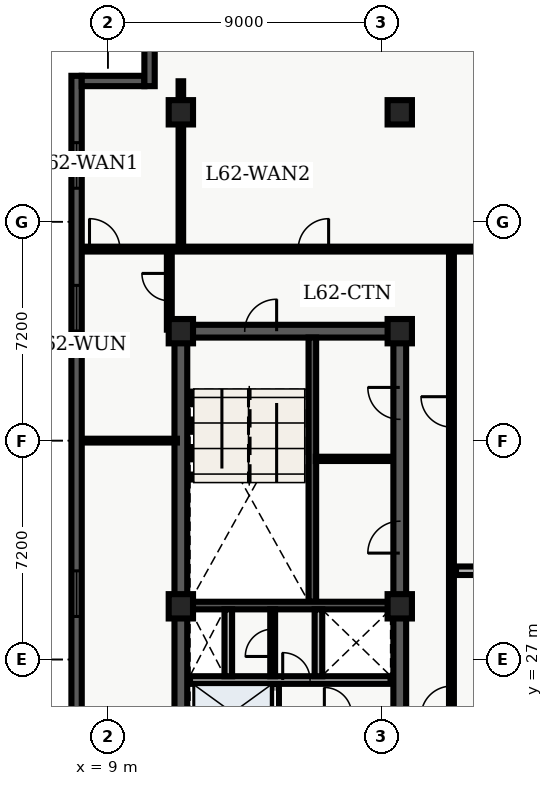
"""IFC4 building model, lengths in metres.
Left out: names, types, materials, properties, quantities, classifications, styles, units other than length and angle.
Written with IfcOpenShell. Run it as: python <this file> out.ifc"""

import sys

from ifc_helpers import new_model, entity, si_unit, converted_unit, direction, frame, origin_with_axes, origin_2d_with_axis, place, context, subcontext, project, spatial, polyline, rectangle, outline, extrude, element, fill, save


model = new_model("IFC4")
c1 = context("Model", 3, precision=1e-05, world=origin_with_axes(), true_north=direction((0.0, 1.0)))
c2 = subcontext(c1, "Body", "Model", "MODEL_VIEW")
j1 = project(units=[si_unit("LENGTHUNIT", "METRE"), converted_unit("PLANEANGLEUNIT", "DEGREE", entity("IfcPlaneAngleMeasure", 0.017), si_unit("PLANEANGLEUNIT", "RADIAN"), dimensions=[0, 0, 0, 0, 0, 0, 0])], contexts=[c1])
p1 = place(None, origin_with_axes())
s1 = spatial("IfcSite", under=j1, at=p1, CompositionType="ELEMENT")
p2 = place(p1, origin_with_axes())
s2 = spatial("IfcBuilding", under=s1, at=p2, CompositionType="ELEMENT")
p3 = place(p2, frame((0.0, 0.0, 252.9), z_axis=(0.0, 0.0, 1.0), x_axis=(1.0, 0.0, 0.0)))
s3 = spatial("IfcBuildingStorey", under=s2, at=p3, CompositionType="ELEMENT", Elevation=252.9)
p4 = place(p3, frame((11.4, 10.8, 0.0), z_axis=(0.0, 0.0, 1.0), x_axis=(0.0, 1.0, 0.0)))
e1 = element("IfcWall", 1, at=p4, inside=s3, PredefinedType="SHEAR", context=c2, shape_type="SweptSolid", body=[
    extrude(outline(polyline([(0.0, -0.21), (27.0, -0.21), (27.0, 0.21), (0.0, 0.21), (0.0, -0.21)])), origin_with_axes(), (0.0, 0.0, 1.0), 3.66),
])
p5 = place(p3, frame((11.4, 37.8, 0.0), z_axis=(0.0, 0.0, 1.0), x_axis=(1.0, 0.0, 0.0)))
e2 = element("IfcWall", 2, at=p5, inside=s3, PredefinedType="SHEAR", context=c2, shape_type="SweptSolid", body=[
    extrude(outline(polyline([(0.0, -0.21), (7.2, -0.21), (7.2, 0.21), (0.0, 0.21), (0.0, -0.21)])), origin_with_axes(), (0.0, 0.0, 1.0), 3.66),
])
p6 = place(p5, frame((2.625, 0.0, 0.0), z_axis=(0.0, 0.0, 1.0), x_axis=(1.0, 0.0, 0.0)))
e3 = element("IfcOpeningElement", 3, at=p6, cuts=e2, PredefinedType="OPENING", context=c2, shape_type="SweptSolid", body=[
    extrude(rectangle(XDim=1.05, YDim=0.44, at=origin_2d_with_axis()), origin_with_axes(), (0.0, 0.0, 1.0), 2.15),
])
p7 = place(p3, frame((18.6, 24.3, 0.0), z_axis=(0.0, 0.0, 1.0), x_axis=(0.0, 1.0, 0.0)))
e4 = element("IfcWall", 4, at=p7, inside=s3, PredefinedType="SHEAR", context=c2, shape_type="SweptSolid", body=[
    extrude(outline(polyline([(0.0, -0.21), (13.5, -0.21), (13.5, 0.21), (0.0, 0.21), (0.0, -0.21)])), origin_with_axes(), (0.0, 0.0, 1.0), 3.66),
])
p8 = place(p7, frame((6.725, 0.0, 0.0), z_axis=(0.0, 0.0, 1.0), x_axis=(1.0, 0.0, 0.0)))
e5 = element("IfcOpeningElement", 5, at=p8, cuts=e4, PredefinedType="OPENING", context=c2, shape_type="SweptSolid", body=[
    extrude(rectangle(XDim=1.05, YDim=0.44, at=origin_2d_with_axis()), origin_with_axes(), (0.0, 0.0, 1.0), 2.15),
])
p9 = place(p7, frame((11.125, 0.0, 0.0), z_axis=(0.0, 0.0, 1.0), x_axis=(1.0, 0.0, 0.0)))
e6 = element("IfcOpeningElement", 6, at=p9, cuts=e4, PredefinedType="OPENING", context=c2, shape_type="SweptSolid", body=[
    extrude(rectangle(XDim=1.05, YDim=0.44, at=origin_2d_with_axis()), origin_with_axes(), (0.0, 0.0, 1.0), 2.15),
])
p10 = place(p3, frame((15.725, 28.9, 0.0), z_axis=(0.0, 0.0, 1.0), x_axis=(0.0, 1.0, 0.0)))
e7 = element("IfcWall", 7, at=p10, inside=s3, PredefinedType="SHEAR", context=c2, shape_type="SweptSolid", body=[
    extrude(outline(polyline([(0.0, -0.125), (8.69, -0.125), (8.69, 0.125), (0.0, 0.125), (0.0, -0.125)])), origin_with_axes(), (0.0, 0.0, 1.0), 3.66),
])
p11 = place(p3, frame((11.61, 28.775, 0.0), z_axis=(0.0, 0.0, 1.0), x_axis=(1.0, 0.0, 0.0)))
e8 = element("IfcWall", 8, at=p11, inside=s3, PredefinedType="SHEAR", context=c2, shape_type="SweptSolid", body=[
    extrude(outline(polyline([(0.0, -0.125), (6.78, -0.125), (6.78, 0.125), (0.0, 0.125), (0.0, -0.125)])), origin_with_axes(), (0.0, 0.0, 1.0), 3.66),
])
p12 = place(p3, frame((14.5, 19.95, 0.0), z_axis=(0.0, 0.0, 1.0), x_axis=(0.0, 1.0, 0.0)))
e9 = element("IfcWall", 9, at=p12, inside=s3, PredefinedType="SOLIDWALL", context=c2, shape_type="SweptSolid", body=[
    extrude(outline(polyline([(0.0, -0.125), (6.25, -0.125), (6.25, 0.125), (0.0, 0.125), (0.0, -0.125)])), origin_with_axes(), (0.0, 0.0, 1.0), 2.7),
])
p13 = place(p12, frame((1.025, 0.0, 0.0), z_axis=(0.0, 0.0, 1.0), x_axis=(1.0, 0.0, 0.0)))
e10 = element("IfcOpeningElement", 10, at=p13, cuts=e9, PredefinedType="OPENING", context=c2, shape_type="SweptSolid", body=[
    extrude(rectangle(XDim=1.1, YDim=0.27, at=origin_2d_with_axis()), origin_with_axes(), (0.0, 0.0, 1.0), 2.15),
])
p14 = place(p12, frame((2.975, 0.0, 0.0), z_axis=(0.0, 0.0, 1.0), x_axis=(1.0, 0.0, 0.0)))
e11 = element("IfcOpeningElement", 11, at=p14, cuts=e9, PredefinedType="OPENING", context=c2, shape_type="SweptSolid", body=[
    extrude(rectangle(XDim=1.1, YDim=0.27, at=origin_2d_with_axis()), origin_with_axes(), (0.0, 0.0, 1.0), 2.15),
])
p15 = place(p12, frame((5.425, 0.0, 0.0), z_axis=(0.0, 0.0, 1.0), x_axis=(1.0, 0.0, 0.0)))
e12 = element("IfcOpeningElement", 12, at=p15, cuts=e9, PredefinedType="OPENING", context=c2, shape_type="SweptSolid", body=[
    extrude(rectangle(XDim=1.2, YDim=0.27, at=origin_2d_with_axis()), origin_with_axes(), (0.0, 0.0, 1.0), 2.15),
])
p16 = place(p3, frame((11.7, 26.325, 0.0), z_axis=(0.0, 0.0, 1.0), x_axis=(1.0, 0.0, 0.0)))
e13 = element("IfcWall", 13, at=p16, inside=s3, PredefinedType="SOLIDWALL", context=c2, shape_type="SweptSolid", body=[
    extrude(outline(polyline([(0.0, -0.125), (6.6, -0.125), (6.6, 0.125), (0.0, 0.125), (0.0, -0.125)])), origin_with_axes(), (0.0, 0.0, 1.0), 2.7),
])
p17 = place(p16, frame((3.5, 0.0, 0.0), z_axis=(0.0, 0.0, 1.0), x_axis=(1.0, 0.0, 0.0)))
e14 = element("IfcOpeningElement", 14, at=p17, cuts=e13, PredefinedType="OPENING", context=c2, shape_type="SweptSolid", body=[
    extrude(rectangle(XDim=0.9, YDim=0.27, at=origin_2d_with_axis()), origin_with_axes(), (0.0, 0.0, 1.0), 2.15),
])
for number, where, z_axis, x_axis in (
    (15, (12.96, 26.45, 0.0), (0.0, 0.0, 1.0), (0.0, 1.0, 0.0)),
    (16, (15.925, 26.45, 0.0), (0.0, 0.0, 1.0), (0.0, 1.0, 0.0)),
):
    element("IfcWall", number, at=place(p3, frame(where, z_axis=z_axis, x_axis=x_axis)), inside=s3, PredefinedType="SOLIDWALL", context=c2, shape_type="SweptSolid", body=[
        extrude(outline(polyline([(0.0, -0.125), (2.2, -0.125), (2.2, 0.125), (0.0, 0.125), (0.0, -0.125)])), origin_with_axes(), (0.0, 0.0, 1.0), 2.7),
    ])
for number, where, z_axis, x_axis in (
    (17, (11.4, 28.75, 0.0), (0.0, 0.0, 1.0), (1.0, 0.0, 0.0)),
    (18, (11.4, 37.8, 0.0), (0.0, 0.0, 1.0), (1.0, 0.0, 0.0)),
    (19, (11.4, 45.0, 0.0), (0.0, 0.0, 1.0), (1.0, 0.0, 0.0)),
    (20, (18.6, 28.75, 0.0), (0.0, 0.0, 1.0), (1.0, 0.0, 0.0)),
    (21, (18.6, 37.8, 0.0), (0.0, 0.0, 1.0), (1.0, 0.0, 0.0)),
    (22, (18.6, 45.0, 0.0), (0.0, 0.0, 1.0), (1.0, 0.0, 0.0)),
):
    element("IfcColumn", number, at=place(p3, frame(where, z_axis=z_axis, x_axis=x_axis)), inside=s3, PredefinedType="COLUMN", context=c2, shape_type="SweptSolid", body=[
        extrude(rectangle(XDim=0.8, YDim=0.8, at=origin_2d_with_axis()), origin_with_axes(), (0.0, 0.0, 1.0), 3.9),
    ])
p18 = place(p3, frame((14.42, 26.45, 0.0), z_axis=(0.0, 0.0, 1.0), x_axis=(0.0, 1.0, 0.0)))
e23 = element("IfcWall", 23, at=p18, inside=s3, PredefinedType="PARTITIONING", context=c2, shape_type="SweptSolid", body=[
    extrude(outline(polyline([(0.0, -0.08), (2.2, -0.08), (2.2, 0.08), (0.0, 0.08), (0.0, -0.08)])), origin_with_axes(), (0.0, 0.0, 1.0), 2.7),
])
p19 = place(p18, frame((1.1, 0.0, 0.0), z_axis=(0.0, 0.0, 1.0), x_axis=(1.0, 0.0, 0.0)))
e24 = element("IfcOpeningElement", 24, at=p19, cuts=e23, PredefinedType="OPENING", context=c2, shape_type="SweptSolid", body=[
    extrude(rectangle(XDim=0.9, YDim=0.18, at=origin_2d_with_axis()), origin_with_axes(), (0.0, 0.0, 1.0), 2.15),
])
p20 = place(p3, frame((15.84, 33.6, 0.0), z_axis=(0.0, 0.0, 1.0), x_axis=(1.0, 0.0, 0.0)))
e25 = element("IfcWall", 25, at=p20, inside=s3, PredefinedType="PARTITIONING", context=c2, shape_type="SweptSolid", body=[
    extrude(outline(polyline([(0.0, -0.07), (2.46, -0.07), (2.46, 0.07), (0.0, 0.07), (0.0, -0.07)])), origin_with_axes(), (0.0, 0.0, 1.0), 2.7),
])
p21 = place(p3, frame((8.135, 40.5, 0.0), z_axis=(0.0, 0.0, 1.0), x_axis=(1.0, 0.0, 0.0)))
e26 = element("IfcWall", 26, at=p21, inside=s3, PredefinedType="PARTITIONING", context=c2, shape_type="SweptSolid", body=[
    extrude(outline(polyline([(0.0, -0.08), (23.93, -0.08), (23.93, 0.08), (0.0, 0.08), (0.0, -0.08)])), origin_with_axes(), (0.0, 0.0, 1.0), 2.7),
])
p22 = place(p21, frame((0.76, 0.0, 0.0), z_axis=(0.0, 0.0, 1.0), x_axis=(1.0, 0.0, 0.0)))
e27 = element("IfcOpeningElement", 27, at=p22, cuts=e26, PredefinedType="OPENING", context=c2, shape_type="SweptSolid", body=[
    extrude(rectangle(XDim=1.0, YDim=0.18, at=origin_2d_with_axis()), origin_with_axes(), (0.0, 0.0, 1.0), 2.15),
])
p23 = place(p21, frame((7.625, 0.0, 0.0), z_axis=(0.0, 0.0, 1.0), x_axis=(1.0, 0.0, 0.0)))
e28 = element("IfcOpeningElement", 28, at=p23, cuts=e26, PredefinedType="OPENING", context=c2, shape_type="SweptSolid", body=[
    extrude(rectangle(XDim=1.0, YDim=0.18, at=origin_2d_with_axis()), origin_with_axes(), (0.0, 0.0, 1.0), 2.15),
])
p24 = place(p3, frame((20.3, 7.8, 0.0), z_axis=(0.0, 0.0, 1.0), x_axis=(0.0, 1.0, 0.0)))
e29 = element("IfcWall", 29, at=p24, inside=s3, PredefinedType="PARTITIONING", context=c2, shape_type="SweptSolid", body=[
    extrude(outline(polyline([(0.0, -0.08), (32.7, -0.08), (32.7, 0.08), (0.0, 0.08), (0.0, -0.08)])), origin_with_axes(), (0.0, 0.0, 1.0), 2.7),
])
p25 = place(p24, frame((17.825, 0.0, 0.0), z_axis=(0.0, 0.0, 1.0), x_axis=(1.0, 0.0, 0.0)))
e30 = element("IfcOpeningElement", 30, at=p25, cuts=e29, PredefinedType="OPENING", context=c2, shape_type="SweptSolid", body=[
    extrude(rectangle(XDim=1.0, YDim=0.18, at=origin_2d_with_axis()), origin_with_axes(), (0.0, 0.0, 1.0), 2.15),
])
p26 = place(p24, frame((27.345, 0.0, 0.0), z_axis=(0.0, 0.0, 1.0), x_axis=(1.0, 0.0, 0.0)))
e31 = element("IfcOpeningElement", 31, at=p26, cuts=e29, PredefinedType="OPENING", context=c2, shape_type="SweptSolid", body=[
    extrude(rectangle(XDim=1.0, YDim=0.18, at=origin_2d_with_axis()), origin_with_axes(), (0.0, 0.0, 1.0), 2.15),
])
p27 = place(p24, frame((5.775, 0.0, 0.0), z_axis=(0.0, 0.0, 1.0), x_axis=(1.0, 0.0, 0.0)))
e32 = element("IfcOpeningElement", 32, at=p27, cuts=e29, PredefinedType="OPENING", context=c2, shape_type="SweptSolid", body=[
    extrude(rectangle(XDim=1.05, YDim=0.18, at=origin_2d_with_axis()), origin_with_axes(), (0.0, 0.0, 1.0), 2.15),
])
p28 = place(p3, frame((11.02, 37.85, 0.0), z_axis=(0.0, 0.0, 1.0), x_axis=(0.0, 1.0, 0.0)))
e33 = element("IfcWall", 33, at=p28, inside=s3, PredefinedType="PARTITIONING", context=c2, shape_type="SweptSolid", body=[
    extrude(outline(polyline([(0.0, -0.08), (2.65, -0.08), (2.65, 0.08), (0.0, 0.08), (0.0, -0.08)])), origin_with_axes(), (0.0, 0.0, 1.0), 2.7),
])
p29 = place(p28, frame((1.4, 0.0, 0.0), z_axis=(0.0, 0.0, 1.0), x_axis=(1.0, 0.0, 0.0)))
e34 = element("IfcOpeningElement", 34, at=p29, cuts=e33, PredefinedType="OPENING", context=c2, shape_type="SweptSolid", body=[
    extrude(rectangle(XDim=0.9, YDim=0.18, at=origin_2d_with_axis()), origin_with_axes(), (0.0, 0.0, 1.0), 2.15),
])
p30 = place(p3, frame((8.135, 34.2, 0.0), z_axis=(0.0, 0.0, 1.0), x_axis=(1.0, 0.0, 0.0)))
e35 = element("IfcWall", 35, at=p30, inside=s3, PredefinedType="PARTITIONING", context=c2, shape_type="SweptSolid", body=[
    extrude(outline(polyline([(0.0, -0.062), (3.135, -0.062), (3.135, 0.062), (0.0, 0.062), (0.0, -0.062)])), origin_with_axes(), (0.0, 0.0, 1.0), 2.7),
])
p31 = place(p3, frame((11.4, 40.6, 0.0), z_axis=(0.0, 0.0, 1.0), x_axis=(0.0, 1.0, 0.0)))
e36 = element("IfcWall", 36, at=p31, inside=s3, PredefinedType="PARTITIONING", context=c2, shape_type="SweptSolid", body=[
    extrude(outline(polyline([(0.0, -0.075), (5.42, -0.075), (5.42, 0.075), (0.0, 0.075), (0.0, -0.075)])), origin_with_axes(), (0.0, 0.0, 1.0), 2.7),
])
p32 = place(p3, frame((20.45, 29.92, 0.0), z_axis=(0.0, 0.0, 1.0), x_axis=(1.0, 0.0, 0.0)))
e37 = element("IfcWall", 37, at=p32, inside=s3, PredefinedType="PARTITIONING", context=c2, shape_type="SweptSolid", body=[
    extrude(outline(polyline([(0.0, -0.14), (11.615, -0.14), (11.615, 0.14), (0.0, 0.14), (0.0, -0.14)])), origin_with_axes(), (0.0, 0.0, 1.0), 2.7),
])
p33 = place(p3, frame((7.97, 2.74, 0.0), z_axis=(0.0, 0.0, 1.0), x_axis=(0.0, 1.0, 0.0)))
e38 = element("IfcWall", 38, at=p33, inside=s3, PredefinedType="SOLIDWALL", context=c2, shape_type="SweptSolid", body=[
    extrude(outline(polyline([(0.0, -0.17), (43.46, -0.17), (43.46, 0.17), (0.0, 0.17), (0.0, -0.17)])), origin_with_axes(), (0.0, 0.0, 1.0), 3.66),
])
p34 = place(p33, frame((2.948, 0.0, 0.45), z_axis=(0.0, 0.0, 1.0), x_axis=(1.0, 0.0, 0.0)))
e39 = element("IfcOpeningElement", 39, at=p34, cuts=e38, PredefinedType="OPENING", context=c2, shape_type="SweptSolid", body=[
    extrude(rectangle(XDim=1.5, YDim=0.36, at=origin_2d_with_axis()), origin_with_axes(), (0.0, 0.0, 1.0), 2.1),
])
p35 = place(p33, frame((7.643, 0.0, 0.45), z_axis=(0.0, 0.0, 1.0), x_axis=(1.0, 0.0, 0.0)))
e40 = element("IfcOpeningElement", 40, at=p35, cuts=e38, PredefinedType="OPENING", context=c2, shape_type="SweptSolid", body=[
    extrude(rectangle(XDim=1.5, YDim=0.36, at=origin_2d_with_axis()), origin_with_axes(), (0.0, 0.0, 1.0), 2.1),
])
p36 = place(p33, frame((13.189, 0.0, 0.45), z_axis=(0.0, 0.0, 1.0), x_axis=(1.0, 0.0, 0.0)))
e41 = element("IfcOpeningElement", 41, at=p36, cuts=e38, PredefinedType="OPENING", context=c2, shape_type="SweptSolid", body=[
    extrude(rectangle(XDim=1.5, YDim=0.36, at=origin_2d_with_axis()), origin_with_axes(), (0.0, 0.0, 1.0), 2.1),
])
p37 = place(p33, frame((17.034, 0.0, 0.45), z_axis=(0.0, 0.0, 1.0), x_axis=(1.0, 0.0, 0.0)))
e42 = element("IfcOpeningElement", 42, at=p37, cuts=e38, PredefinedType="OPENING", context=c2, shape_type="SweptSolid", body=[
    extrude(rectangle(XDim=1.5, YDim=0.36, at=origin_2d_with_axis()), origin_with_axes(), (0.0, 0.0, 1.0), 2.1),
])
p38 = place(p33, frame((21.73, 0.0, 0.45), z_axis=(0.0, 0.0, 1.0), x_axis=(1.0, 0.0, 0.0)))
e43 = element("IfcOpeningElement", 43, at=p38, cuts=e38, PredefinedType="OPENING", context=c2, shape_type="SweptSolid", body=[
    extrude(rectangle(XDim=1.5, YDim=0.36, at=origin_2d_with_axis()), origin_with_axes(), (0.0, 0.0, 1.0), 2.1),
])
p39 = place(p33, frame((26.426, 0.0, 0.45), z_axis=(0.0, 0.0, 1.0), x_axis=(1.0, 0.0, 0.0)))
e44 = element("IfcOpeningElement", 44, at=p39, cuts=e38, PredefinedType="OPENING", context=c2, shape_type="SweptSolid", body=[
    extrude(rectangle(XDim=1.5, YDim=0.36, at=origin_2d_with_axis()), origin_with_axes(), (0.0, 0.0, 1.0), 2.1),
])
p40 = place(p33, frame((35.817, 0.0, 0.45), z_axis=(0.0, 0.0, 1.0), x_axis=(1.0, 0.0, 0.0)))
e45 = element("IfcOpeningElement", 45, at=p40, cuts=e38, PredefinedType="OPENING", context=c2, shape_type="SweptSolid", body=[
    extrude(rectangle(XDim=1.5, YDim=0.36, at=origin_2d_with_axis()), origin_with_axes(), (0.0, 0.0, 1.0), 2.1),
])
p41 = place(p33, frame((40.512, 0.0, 0.45), z_axis=(0.0, 0.0, 1.0), x_axis=(1.0, 0.0, 0.0)))
e46 = element("IfcOpeningElement", 46, at=p41, cuts=e38, PredefinedType="OPENING", context=c2, shape_type="SweptSolid", body=[
    extrude(rectangle(XDim=1.5, YDim=0.36, at=origin_2d_with_axis()), origin_with_axes(), (0.0, 0.0, 1.0), 2.1),
])
p42 = place(p3, frame((8.14, 46.03, 0.0), z_axis=(0.0, 0.0, 1.0), x_axis=(1.0, 0.0, 0.0)))
e47 = element("IfcWall", 47, at=p42, inside=s3, PredefinedType="SOLIDWALL", context=c2, shape_type="SweptSolid", body=[
    extrude(outline(polyline([(0.0, -0.17), (2.06, -0.17), (2.06, 0.17), (0.0, 0.17), (0.0, -0.17)])), origin_with_axes(), (0.0, 0.0, 1.0), 3.66),
])
p43 = place(p3, frame((10.37, 45.86, 0.0), z_axis=(0.0, 0.0, 1.0), x_axis=(0.0, 1.0, 0.0)))
e48 = element("IfcWall", 48, at=p43, inside=s3, PredefinedType="SOLIDWALL", context=c2, shape_type="SweptSolid", body=[
    extrude(outline(polyline([(0.0, -0.17), (2.74, -0.17), (2.74, 0.17), (0.0, 0.17), (0.0, -0.17)])), origin_with_axes(), (0.0, 0.0, 1.0), 3.66),
])
p44 = place(p12, frame((5.425, 0.0, 0.0), z_axis=(0.0, 0.0, 1.0), x_axis=(1.0, 0.0, 0.0)))
e49 = element("IfcDoor", 49, at=p44, inside=s3, OperationType="DOUBLE_DOOR_SLIDING", PredefinedType="DOOR", context=c2, shape_type="SweptSolid", body=[
    extrude(rectangle(XDim=1.2, YDim=0.09, at=origin_2d_with_axis()), origin_with_axes(), (0.0, 0.0, 1.0), 2.15),
])
fill(e12, e49)
p45 = place(p5, frame((2.625, 0.0, 0.0), z_axis=(0.0, 0.0, 1.0), x_axis=(1.0, 0.0, 0.0)))
e50 = element("IfcDoor", 50, at=p45, inside=s3, OperationType="SINGLE_SWING_RIGHT", PredefinedType="DOOR", context=c2, shape_type="SweptSolid", body=[
    extrude(rectangle(XDim=1.05, YDim=0.09, at=origin_2d_with_axis()), origin_with_axes(), (0.0, 0.0, 1.0), 2.15),
])
fill(e3, e50)
p46 = place(p16, frame((3.5, 0.0, 0.0), z_axis=(0.0, 0.0, 1.0), x_axis=(1.0, 0.0, 0.0)))
e51 = element("IfcDoor", 51, at=p46, inside=s3, OperationType="SINGLE_SWING_LEFT", PredefinedType="DOOR", context=c2, shape_type="SweptSolid", body=[
    extrude(rectangle(XDim=0.9, YDim=0.09, at=origin_2d_with_axis()), origin_with_axes(), (0.0, 0.0, 1.0), 2.15),
])
fill(e14, e51)
p47 = place(p18, frame((1.1, 0.0, 0.0), z_axis=(0.0, 0.0, 1.0), x_axis=(1.0, 0.0, 0.0)))
e52 = element("IfcDoor", 52, at=p47, inside=s3, OperationType="SINGLE_SWING_LEFT", PredefinedType="DOOR", context=c2, shape_type="SweptSolid", body=[
    extrude(rectangle(XDim=0.9, YDim=0.09, at=origin_2d_with_axis()), origin_with_axes(), (0.0, 0.0, 1.0), 2.15),
])
fill(e24, e52)
p48 = place(p7, frame((6.725, 0.0, 0.0), z_axis=(0.0, 0.0, 1.0), x_axis=(1.0, 0.0, 0.0)))
e53 = element("IfcDoor", 53, at=p48, inside=s3, OperationType="SINGLE_SWING_LEFT", PredefinedType="DOOR", context=c2, shape_type="SweptSolid", body=[
    extrude(rectangle(XDim=1.05, YDim=0.09, at=origin_2d_with_axis()), origin_with_axes(), (0.0, 0.0, 1.0), 2.15),
])
fill(e5, e53)
p49 = place(p7, frame((11.125, 0.0, 0.0), z_axis=(0.0, 0.0, 1.0), x_axis=(1.0, 0.0, 0.0)))
e54 = element("IfcDoor", 54, at=p49, inside=s3, OperationType="SINGLE_SWING_RIGHT", PredefinedType="DOOR", context=c2, shape_type="SweptSolid", body=[
    extrude(rectangle(XDim=1.05, YDim=0.09, at=origin_2d_with_axis()), origin_with_axes(), (0.0, 0.0, 1.0), 2.15),
])
fill(e6, e54)
p50 = place(p28, frame((1.4, 0.0, 0.0), z_axis=(0.0, 0.0, 1.0), x_axis=(1.0, 0.0, 0.0)))
e55 = element("IfcDoor", 55, at=p50, inside=s3, OperationType="SINGLE_SWING_RIGHT", PredefinedType="DOOR", context=c2, shape_type="SweptSolid", body=[
    extrude(rectangle(XDim=0.9, YDim=0.09, at=origin_2d_with_axis()), origin_with_axes(), (0.0, 0.0, 1.0), 2.15),
])
fill(e34, e55)
p51 = place(p21, frame((0.76, 0.0, 0.0), z_axis=(0.0, 0.0, 1.0), x_axis=(1.0, 0.0, 0.0)))
e56 = element("IfcDoor", 56, at=p51, inside=s3, OperationType="SINGLE_SWING_LEFT", PredefinedType="DOOR", context=c2, shape_type="SweptSolid", body=[
    extrude(rectangle(XDim=1.0, YDim=0.09, at=origin_2d_with_axis()), origin_with_axes(), (0.0, 0.0, 1.0), 2.15),
])
fill(e27, e56)
p52 = place(p21, frame((7.625, 0.0, 0.0), z_axis=(0.0, 0.0, 1.0), x_axis=(1.0, 0.0, 0.0)))
e57 = element("IfcDoor", 57, at=p52, inside=s3, OperationType="SINGLE_SWING_RIGHT", PredefinedType="DOOR", context=c2, shape_type="SweptSolid", body=[
    extrude(rectangle(XDim=1.0, YDim=0.09, at=origin_2d_with_axis()), origin_with_axes(), (0.0, 0.0, 1.0), 2.15),
])
fill(e28, e57)
p53 = place(p24, frame((17.825, 0.0, 0.0), z_axis=(0.0, 0.0, 1.0), x_axis=(1.0, 0.0, 0.0)))
e58 = element("IfcDoor", 58, at=p53, inside=s3, OperationType="SINGLE_SWING_LEFT", PredefinedType="DOOR", context=c2, shape_type="SweptSolid", body=[
    extrude(rectangle(XDim=1.0, YDim=0.09, at=origin_2d_with_axis()), origin_with_axes(), (0.0, 0.0, 1.0), 2.15),
])
fill(e30, e58)
p54 = place(p24, frame((27.345, 0.0, 0.0), z_axis=(0.0, 0.0, 1.0), x_axis=(1.0, 0.0, 0.0)))
e59 = element("IfcDoor", 59, at=p54, inside=s3, OperationType="SINGLE_SWING_RIGHT", PredefinedType="DOOR", context=c2, shape_type="SweptSolid", body=[
    extrude(rectangle(XDim=1.0, YDim=0.09, at=origin_2d_with_axis()), origin_with_axes(), (0.0, 0.0, 1.0), 2.15),
])
fill(e31, e59)
p55 = place(p33, frame((26.426, 0.0, 0.45), z_axis=(0.0, 0.0, 1.0), x_axis=(1.0, 0.0, 0.0)))
e60 = element("IfcWindow", 60, at=p55, inside=s3, PredefinedType="WINDOW", context=c2, shape_type="SweptSolid", body=[
    extrude(rectangle(XDim=1.5, YDim=0.09, at=origin_2d_with_axis()), origin_with_axes(), (0.0, 0.0, 1.0), 2.1),
])
fill(e44, e60)
p56 = place(p33, frame((35.817, 0.0, 0.45), z_axis=(0.0, 0.0, 1.0), x_axis=(1.0, 0.0, 0.0)))
e61 = element("IfcWindow", 61, at=p56, inside=s3, PredefinedType="WINDOW", context=c2, shape_type="SweptSolid", body=[
    extrude(rectangle(XDim=1.5, YDim=0.09, at=origin_2d_with_axis()), origin_with_axes(), (0.0, 0.0, 1.0), 2.1),
])
fill(e45, e61)
p57 = place(p33, frame((40.512, 0.0, 0.45), z_axis=(0.0, 0.0, 1.0), x_axis=(1.0, 0.0, 0.0)))
e62 = element("IfcWindow", 62, at=p57, inside=s3, PredefinedType="WINDOW", context=c2, shape_type="SweptSolid", body=[
    extrude(rectangle(XDim=1.5, YDim=0.09, at=origin_2d_with_axis()), origin_with_axes(), (0.0, 0.0, 1.0), 2.1),
])
fill(e46, e62)
save(model, sys.argv[1])
